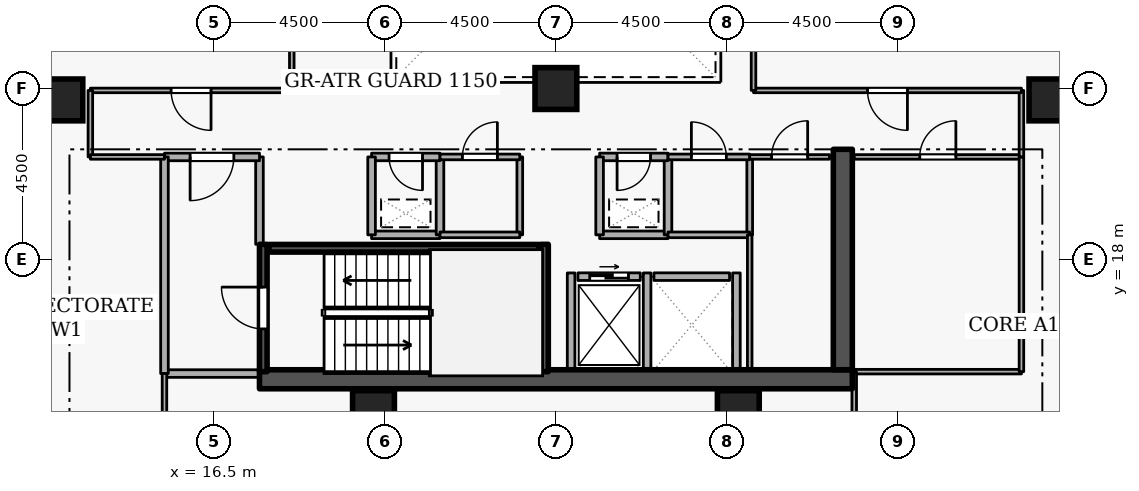
"""IFC4 building model, lengths in metres.
Left out: names, types, materials, properties, quantities, classifications, styles, units other than length and angle.
Written with IfcOpenShell. Run it as: python <this file> out.ifc"""

import sys

from ifc_helpers import new_model, si_unit, direction, frame, frame_2d, origin, origin_2d, place, context, subcontext, project, spatial, rectangle, extrude, element, fill, save


model = new_model("IFC4")
c1 = context("Model", 3, precision=1e-05, world=origin(), true_north=direction((0.0, 1.0)))
c2 = subcontext(c1, "Body", "Model", "MODEL_VIEW")
j1 = project(units=[si_unit("LENGTHUNIT", "METRE"), si_unit("PLANEANGLEUNIT", "RADIAN")], contexts=[c1])
p1 = place(None, origin())
s1 = spatial("IfcSite", under=j1, at=p1, CompositionType="ELEMENT")
p2 = place(p1, origin())
s2 = spatial("IfcBuilding", under=s1, at=p2, CompositionType="ELEMENT")
p3 = place(p2, frame((0.0, 0.0, 156.3)))
s3 = spatial("IfcBuildingStorey", under=s2, at=p3, CompositionType="ELEMENT", Elevation=156.3)
p4 = place(p3, frame((17.7, 14.85, 0.0), z_axis=(0.0, 0.0, 1.0), x_axis=(1.0, 0.0, 0.0)))
e1 = element("IfcWall", 1, at=p4, inside=s3, PredefinedType="SHEAR", context=c2, shape_type="SweptSolid", body=[
    extrude(rectangle(XDim=15.6, YDim=0.5, at=frame_2d((7.8, 0.0))), origin(), (0.0, 0.0, 1.0), 3.6),
])
p5 = place(p3, frame((33.05, 15.1, 0.0), z_axis=(0.0, 0.0, 1.0), x_axis=(0.0, 1.0, 0.0)))
e2 = element("IfcWall", 2, at=p5, inside=s3, PredefinedType="SHEAR", context=c2, shape_type="SweptSolid", body=[
    extrude(rectangle(XDim=5.8, YDim=0.5, at=frame_2d((2.9, 0.0))), origin(), (0.0, 0.0, 1.0), 3.6),
])
for number, where, z_axis, x_axis in (
    (3, (12.5, 22.2, 0.0), (0.0, 0.0, 1.0), (1.0, 0.0, 0.0)),
    (4, (38.5, 22.2, 0.0), (0.0, 0.0, 1.0), (1.0, 0.0, 0.0)),
    (5, (20.7, 14.0, 0.0), (0.0, 0.0, 1.0), (1.0, 0.0, 0.0)),
    (6, (30.3, 14.0, 0.0), (0.0, 0.0, 1.0), (1.0, 0.0, 0.0)),
    (7, (25.5, 22.5, 0.0), (0.0, 0.0, 1.0), (1.0, 0.0, 0.0)),
):
    element("IfcColumn", number, at=place(p3, frame(where, z_axis=z_axis, x_axis=x_axis)), inside=s3, PredefinedType="COLUMN", context=c2, shape_type="SweptSolid", body=[
        extrude(rectangle(XDim=1.1, YDim=1.1, at=origin_2d()), origin(), (0.0, 0.0, 1.0), 3.6),
    ])
p6 = place(p3, frame((26.08, 17.55, 0.0), z_axis=(0.0, 0.0, 1.0), x_axis=(1.0, 0.0, 0.0)))
e8 = element("IfcWall", 8, at=p6, inside=s3, PredefinedType="STANDARD", context=c2, shape_type="SweptSolid", body=[
    extrude(rectangle(XDim=1.64, YDim=0.2, at=frame_2d((0.82, 0.0))), origin(), (0.0, 0.0, 1.0), 3.34),
])
p7 = place(p6, frame((0.31, 0.0, 0.0)))
e9 = element("IfcOpeningElement", 9, at=p7, cuts=e8, PredefinedType="OPENING", context=c2, shape_type="SweptSolid", body=[
    extrude(rectangle(XDim=1.02, YDim=2.06, at=frame_2d((0.51, 1.03))), frame((0.0, 0.11, 0.0), z_axis=(0.0, -1.0, 0.0), x_axis=(1.0, 0.0, 0.0)), (0.0, 0.0, 1.0), 0.22),
])
p8 = place(p3, frame((28.08, 17.55, 0.0), z_axis=(0.0, 0.0, 1.0), x_axis=(1.0, 0.0, 0.0)))
e10 = element("IfcWall", 10, at=p8, inside=s3, PredefinedType="STANDARD", context=c2, shape_type="SweptSolid", body=[
    extrude(rectangle(XDim=1.99, YDim=0.2, at=frame_2d((0.995, 0.0))), origin(), (0.0, 0.0, 1.0), 3.34),
])
for number, where, z_axis, x_axis in (
    (11, (27.9, 15.112, 0.0), (0.0, 0.0, 1.0), (0.0, 1.0, 0.0)),
    (12, (25.9, 15.112, 0.0), (0.0, 0.0, 1.0), (0.0, 1.0, 0.0)),
    (13, (30.25, 15.112, 0.0), (0.0, 0.0, 1.0), (0.0, 1.0, 0.0)),
):
    element("IfcWall", number, at=place(p3, frame(where, z_axis=z_axis, x_axis=x_axis)), inside=s3, PredefinedType="STANDARD", context=c2, shape_type="SweptSolid", body=[
        extrude(rectangle(XDim=2.536, YDim=0.2, at=frame_2d((1.268, 0.0))), origin(), (0.0, 0.0, 1.0), 3.34),
    ])
p9 = place(p3, frame((17.8, 15.05, 0.0), z_axis=(0.0, 0.0, 1.0), x_axis=(0.0, 1.0, 0.0)))
e14 = element("IfcWall", 14, at=p9, inside=s3, PredefinedType="SHEAR", context=c2, shape_type="SweptSolid", body=[
    extrude(rectangle(XDim=3.35, YDim=0.2, at=frame_2d((1.675, 0.0))), origin(), (0.0, 0.0, 1.0), 3.6),
])
p10 = place(p9, frame((1.125, 0.0, 0.0)))
e15 = element("IfcOpeningElement", 15, at=p10, cuts=e14, PredefinedType="OPENING", context=c2, shape_type="SweptSolid", body=[
    extrude(rectangle(XDim=1.1, YDim=2.1, at=frame_2d((0.55, 1.05))), frame((0.0, 0.11, 0.0), z_axis=(0.0, -1.0, 0.0), x_axis=(1.0, 0.0, 0.0)), (0.0, 0.0, 1.0), 0.22),
])
p11 = place(p3, frame((25.2, 18.4, 0.0), z_axis=(0.0, 0.0, 1.0), x_axis=(0.0, -1.0, 0.0)))
e16 = element("IfcWall", 16, at=p11, inside=s3, PredefinedType="SHEAR", context=c2, shape_type="SweptSolid", body=[
    extrude(rectangle(XDim=3.35, YDim=0.2, at=frame_2d((1.675, 0.0))), origin(), (0.0, 0.0, 1.0), 3.6),
])
p12 = place(p3, frame((25.05, 18.297, 0.0), z_axis=(0.0, 0.0, 1.0), x_axis=(-1.0, 0.0, 0.0)))
e17 = element("IfcWall", 17, at=p12, inside=s3, PredefinedType="SHEAR", context=c2, shape_type="SweptSolid", body=[
    extrude(rectangle(XDim=7.1, YDim=0.2, at=frame_2d((3.55, 0.0))), origin(), (0.0, 0.0, 1.0), 3.6),
])
p13 = place(p3, frame((15.2, 15.0, 0.0), z_axis=(0.0, 0.0, 1.0), x_axis=(1.0, 0.0, 0.0)))
e18 = element("IfcWall", 18, at=p13, inside=s3, PredefinedType="STANDARD", context=c2, shape_type="SweptSolid", body=[
    extrude(rectangle(XDim=2.5, YDim=0.2, at=frame_2d((1.25, 0.0))), origin(), (0.0, 0.0, 1.0), 3.34),
])
p14 = place(p3, frame((17.7, 18.4, 0.0), z_axis=(0.0, 0.0, 1.0), x_axis=(0.0, 1.0, 0.0)))
e19 = element("IfcWall", 19, at=p14, inside=s3, PredefinedType="STANDARD", context=c2, shape_type="SweptSolid", body=[
    extrude(rectangle(XDim=2.3, YDim=0.2, at=frame_2d((1.15, 0.0))), origin(), (0.0, 0.0, 1.0), 2.545),
])
p15 = place(p3, frame((17.7, 20.7, 0.0), z_axis=(0.0, 0.0, 1.0), x_axis=(-1.0, 0.0, 0.0)))
e20 = element("IfcWall", 20, at=p15, inside=s3, PredefinedType="STANDARD", context=c2, shape_type="SweptSolid", body=[
    extrude(rectangle(XDim=2.5, YDim=0.2, at=frame_2d((1.25, 0.0))), origin(), (0.0, 0.0, 1.0), 3.34),
])
p16 = place(p15, frame((0.675, 0.0, 0.0)))
e21 = element("IfcOpeningElement", 21, at=p16, cuts=e20, PredefinedType="OPENING", context=c2, shape_type="SweptSolid", body=[
    extrude(rectangle(XDim=1.15, YDim=2.1, at=frame_2d((0.575, 1.05))), frame((0.0, 0.11, 0.0), z_axis=(0.0, -1.0, 0.0), x_axis=(1.0, 0.0, 0.0)), (0.0, 0.0, 1.0), 0.22),
])
p17 = place(p3, frame((15.2, 20.7, 0.0), z_axis=(0.0, 0.0, 1.0), x_axis=(0.0, -1.0, 0.0)))
e22 = element("IfcWall", 22, at=p17, inside=s3, PredefinedType="STANDARD", context=c2, shape_type="SweptSolid", body=[
    extrude(rectangle(XDim=5.7, YDim=0.2, at=frame_2d((2.85, 0.0))), origin(), (0.0, 0.0, 1.0), 3.34),
])
p18 = place(p3, frame((26.65, 18.65, 0.0), z_axis=(0.0, 0.0, 1.0), x_axis=(1.0, 0.0, 0.0)))
e23 = element("IfcWall", 23, at=p18, inside=s3, PredefinedType="STANDARD", context=c2, shape_type="SweptSolid", body=[
    extrude(rectangle(XDim=1.8, YDim=0.2, at=frame_2d((0.9, 0.0))), origin(), (0.0, 0.0, 1.0), 3.34),
])
p19 = place(p3, frame((28.45, 18.65, 0.0), z_axis=(0.0, 0.0, 1.0), x_axis=(0.0, 1.0, 0.0)))
e24 = element("IfcWall", 24, at=p19, inside=s3, PredefinedType="STANDARD", context=c2, shape_type="SweptSolid", body=[
    extrude(rectangle(XDim=2.05, YDim=0.2, at=frame_2d((1.025, 0.0))), origin(), (0.0, 0.0, 1.0), 3.34),
])
p20 = place(p3, frame((28.45, 20.7, 0.0), z_axis=(0.0, 0.0, 1.0), x_axis=(-1.0, 0.0, 0.0)))
e25 = element("IfcWall", 25, at=p20, inside=s3, PredefinedType="STANDARD", context=c2, shape_type="SweptSolid", body=[
    extrude(rectangle(XDim=1.8, YDim=0.2, at=frame_2d((0.9, 0.0))), origin(), (0.0, 0.0, 1.0), 3.34),
])
p21 = place(p20, frame((0.46, 0.0, 0.0)))
e26 = element("IfcOpeningElement", 26, at=p21, cuts=e25, PredefinedType="OPENING", context=c2, shape_type="SweptSolid", body=[
    extrude(rectangle(XDim=0.88, YDim=2.04, at=frame_2d((0.44, 1.02))), frame((0.0, 0.11, 0.0), z_axis=(0.0, -1.0, 0.0), x_axis=(1.0, 0.0, 0.0)), (0.0, 0.0, 1.0), 0.22),
])
p22 = place(p3, frame((26.65, 20.7, 0.0), z_axis=(0.0, 0.0, 1.0), x_axis=(0.0, -1.0, 0.0)))
e27 = element("IfcWall", 27, at=p22, inside=s3, PredefinedType="STANDARD", context=c2, shape_type="SweptSolid", body=[
    extrude(rectangle(XDim=2.05, YDim=0.2, at=frame_2d((1.025, 0.0))), origin(), (0.0, 0.0, 1.0), 3.34),
])
p23 = place(p3, frame((20.65, 18.65, 0.0), z_axis=(0.0, 0.0, 1.0), x_axis=(1.0, 0.0, 0.0)))
e28 = element("IfcWall", 28, at=p23, inside=s3, PredefinedType="STANDARD", context=c2, shape_type="SweptSolid", body=[
    extrude(rectangle(XDim=1.8, YDim=0.2, at=frame_2d((0.9, 0.0))), origin(), (0.0, 0.0, 1.0), 3.34),
])
p24 = place(p3, frame((22.45, 18.65, 0.0), z_axis=(0.0, 0.0, 1.0), x_axis=(0.0, 1.0, 0.0)))
e29 = element("IfcWall", 29, at=p24, inside=s3, PredefinedType="STANDARD", context=c2, shape_type="SweptSolid", body=[
    extrude(rectangle(XDim=2.05, YDim=0.2, at=frame_2d((1.025, 0.0))), origin(), (0.0, 0.0, 1.0), 3.34),
])
p25 = place(p3, frame((22.45, 20.7, 0.0), z_axis=(0.0, 0.0, 1.0), x_axis=(-1.0, 0.0, 0.0)))
e30 = element("IfcWall", 30, at=p25, inside=s3, PredefinedType="STANDARD", context=c2, shape_type="SweptSolid", body=[
    extrude(rectangle(XDim=1.8, YDim=0.2, at=frame_2d((0.9, 0.0))), origin(), (0.0, 0.0, 1.0), 3.34),
])
p26 = place(p25, frame((0.46, 0.0, 0.0)))
e31 = element("IfcOpeningElement", 31, at=p26, cuts=e30, PredefinedType="OPENING", context=c2, shape_type="SweptSolid", body=[
    extrude(rectangle(XDim=0.88, YDim=2.04, at=frame_2d((0.44, 1.02))), frame((0.0, 0.11, 0.0), z_axis=(0.0, -1.0, 0.0), x_axis=(1.0, 0.0, 0.0)), (0.0, 0.0, 1.0), 0.22),
])
p27 = place(p3, frame((20.65, 20.7, 0.0), z_axis=(0.0, 0.0, 1.0), x_axis=(0.0, -1.0, 0.0)))
e32 = element("IfcWall", 32, at=p27, inside=s3, PredefinedType="STANDARD", context=c2, shape_type="SweptSolid", body=[
    extrude(rectangle(XDim=2.05, YDim=0.2, at=frame_2d((1.025, 0.0))), origin(), (0.0, 0.0, 1.0), 3.34),
])
p28 = place(p3, frame((24.55, 20.7, 0.0), z_axis=(0.0, 0.0, 1.0), x_axis=(0.0, -1.0, 0.0)))
e33 = element("IfcWall", 33, at=p28, inside=s3, PredefinedType="PARTITIONING", context=c2, shape_type="SweptSolid", body=[
    extrude(rectangle(XDim=2.05, YDim=0.15, at=frame_2d((1.025, 0.0))), origin(), (0.0, 0.0, 1.0), 3.34),
])
p29 = place(p3, frame((24.55, 18.65, 0.0), z_axis=(0.0, 0.0, 1.0), x_axis=(-1.0, 0.0, 0.0)))
e34 = element("IfcWall", 34, at=p29, inside=s3, PredefinedType="PARTITIONING", context=c2, shape_type="SweptSolid", body=[
    extrude(rectangle(XDim=2.1, YDim=0.15, at=frame_2d((1.05, 0.0))), origin(), (0.0, 0.0, 1.0), 3.34),
])
p30 = place(p3, frame((22.45, 20.7, 0.0), z_axis=(0.0, 0.0, 1.0), x_axis=(1.0, 0.0, 0.0)))
e35 = element("IfcWall", 35, at=p30, inside=s3, PredefinedType="PARTITIONING", context=c2, shape_type="SweptSolid", body=[
    extrude(rectangle(XDim=2.1, YDim=0.15, at=frame_2d((1.05, 0.0))), origin(), (0.0, 0.0, 1.0), 3.34),
])
p31 = place(p30, frame((0.59, 0.0, 0.0)))
e36 = element("IfcOpeningElement", 36, at=p31, cuts=e35, PredefinedType="OPENING", context=c2, shape_type="SweptSolid", body=[
    extrude(rectangle(XDim=0.92, YDim=2.08, at=frame_2d((0.46, 1.04))), frame((0.0, 0.085, 0.0), z_axis=(0.0, -1.0, 0.0), x_axis=(1.0, 0.0, 0.0)), (0.0, 0.0, 1.0), 0.17),
])
p32 = place(p3, frame((30.6, 20.7, 0.0), z_axis=(0.0, 0.0, 1.0), x_axis=(0.0, -1.0, 0.0)))
e37 = element("IfcWall", 37, at=p32, inside=s3, PredefinedType="PARTITIONING", context=c2, shape_type="SweptSolid", body=[
    extrude(rectangle(XDim=2.05, YDim=0.15, at=frame_2d((1.025, 0.0))), origin(), (0.0, 0.0, 1.0), 3.34),
])
p33 = place(p3, frame((30.6, 18.65, 0.0), z_axis=(0.0, 0.0, 1.0), x_axis=(-1.0, 0.0, 0.0)))
e38 = element("IfcWall", 38, at=p33, inside=s3, PredefinedType="PARTITIONING", context=c2, shape_type="SweptSolid", body=[
    extrude(rectangle(XDim=2.15, YDim=0.15, at=frame_2d((1.075, 0.0))), origin(), (0.0, 0.0, 1.0), 3.34),
])
p34 = place(p3, frame((28.45, 20.7, 0.0), z_axis=(0.0, 0.0, 1.0), x_axis=(1.0, 0.0, 0.0)))
e39 = element("IfcWall", 39, at=p34, inside=s3, PredefinedType="PARTITIONING", context=c2, shape_type="SweptSolid", body=[
    extrude(rectangle(XDim=2.15, YDim=0.15, at=frame_2d((1.075, 0.0))), origin(), (0.0, 0.0, 1.0), 3.34),
])
p35 = place(p34, frame((0.615, 0.0, 0.0)))
e40 = element("IfcOpeningElement", 40, at=p35, cuts=e39, PredefinedType="OPENING", context=c2, shape_type="SweptSolid", body=[
    extrude(rectangle(XDim=0.92, YDim=2.08, at=frame_2d((0.46, 1.04))), frame((0.0, 0.085, 0.0), z_axis=(0.0, -1.0, 0.0), x_axis=(1.0, 0.0, 0.0)), (0.0, 0.0, 1.0), 0.17),
])
p36 = place(p3, frame((30.6, 15.1, 0.0), z_axis=(0.0, 0.0, 1.0), x_axis=(0.0, 1.0, 0.0)))
e41 = element("IfcWall", 41, at=p36, inside=s3, PredefinedType="PARTITIONING", context=c2, shape_type="SweptSolid", body=[
    extrude(rectangle(XDim=3.55, YDim=0.12, at=frame_2d((1.775, 0.0))), origin(), (0.0, 0.0, 1.0), 3.34),
])
p37 = place(p3, frame((30.6, 20.7, 0.0), z_axis=(0.0, 0.0, 1.0), x_axis=(1.0, 0.0, 0.0)))
e42 = element("IfcWall", 42, at=p37, inside=s3, PredefinedType="PARTITIONING", context=c2, shape_type="SweptSolid", body=[
    extrude(rectangle(XDim=2.1, YDim=0.12, at=frame_2d((1.05, 0.0))), origin(), (0.0, 0.0, 1.0), 3.34),
])
p38 = place(p37, frame((0.575, 0.0, 0.0)))
e43 = element("IfcOpeningElement", 43, at=p38, cuts=e42, PredefinedType="OPENING", context=c2, shape_type="SweptSolid", body=[
    extrude(rectangle(XDim=0.95, YDim=2.1, at=frame_2d((0.475, 1.05))), frame((0.0, 0.07, 0.0), z_axis=(0.0, -1.0, 0.0), x_axis=(1.0, 0.0, 0.0)), (0.0, 0.0, 1.0), 0.14),
])
p39 = place(p3, frame((37.75, 15.05, 0.0), z_axis=(0.0, 0.0, 1.0), x_axis=(-1.0, 0.0, 0.0)))
e44 = element("IfcWall", 44, at=p39, inside=s3, PredefinedType="PARTITIONING", context=c2, shape_type="SweptSolid", body=[
    extrude(rectangle(XDim=4.4, YDim=0.12, at=frame_2d((2.2, 0.0))), origin(), (0.0, 0.0, 1.0), 3.34),
])
p40 = place(p3, frame((33.35, 20.7, 0.0), z_axis=(0.0, 0.0, 1.0), x_axis=(1.0, 0.0, 0.0)))
e45 = element("IfcWall", 45, at=p40, inside=s3, PredefinedType="PARTITIONING", context=c2, shape_type="SweptSolid", body=[
    extrude(rectangle(XDim=4.4, YDim=0.12, at=frame_2d((2.2, 0.0))), origin(), (0.0, 0.0, 1.0), 3.34),
])
p41 = place(p40, frame((1.725, 0.0, 0.0)))
e46 = element("IfcOpeningElement", 46, at=p41, cuts=e45, PredefinedType="OPENING", context=c2, shape_type="SweptSolid", body=[
    extrude(rectangle(XDim=0.95, YDim=2.1, at=frame_2d((0.475, 1.05))), frame((0.0, 0.07, 0.0), z_axis=(0.0, -1.0, 0.0), x_axis=(1.0, 0.0, 0.0)), (0.0, 0.0, 1.0), 0.14),
])
p42 = place(p3, frame((37.75, 20.7, 0.0), z_axis=(0.0, 0.0, 1.0), x_axis=(0.0, -1.0, 0.0)))
e47 = element("IfcWall", 47, at=p42, inside=s3, PredefinedType="PARTITIONING", context=c2, shape_type="SweptSolid", body=[
    extrude(rectangle(XDim=5.65, YDim=0.12, at=frame_2d((2.825, 0.0))), origin(), (0.0, 0.0, 1.0), 3.34),
])
p43 = place(p3, frame((18.55, 27.0, 0.0), z_axis=(0.0, 0.0, 1.0), x_axis=(0.0, -1.0, 0.0)))
e48 = element("IfcWall", 48, at=p43, inside=s3, PredefinedType="PARTITIONING", context=c2, shape_type="SweptSolid", body=[
    extrude(rectangle(XDim=4.55, YDim=0.12, at=frame_2d((2.275, 0.0))), origin(), (0.0, 0.0, 1.0), 3.34),
])
p44 = place(p3, frame((18.55, 22.45, 0.0), z_axis=(0.0, 0.0, 1.0), x_axis=(-1.0, 0.0, 0.0)))
e49 = element("IfcWall", 49, at=p44, inside=s3, PredefinedType="PARTITIONING", context=c2, shape_type="SweptSolid", body=[
    extrude(rectangle(XDim=5.3, YDim=0.12, at=frame_2d((2.65, 0.0))), origin(), (0.0, 0.0, 1.0), 3.34),
])
p45 = place(p44, frame((2.125, 0.0, 0.0)))
e50 = element("IfcOpeningElement", 50, at=p45, cuts=e49, PredefinedType="OPENING", context=c2, shape_type="SweptSolid", body=[
    extrude(rectangle(XDim=1.05, YDim=2.1, at=frame_2d((0.525, 1.05))), frame((0.0, 0.07, 0.0), z_axis=(0.0, -1.0, 0.0), x_axis=(1.0, 0.0, 0.0)), (0.0, 0.0, 1.0), 0.14),
])
p46 = place(p3, frame((13.25, 22.45, 0.0), z_axis=(0.0, 0.0, 1.0), x_axis=(0.0, -1.0, 0.0)))
e51 = element("IfcWall", 51, at=p46, inside=s3, PredefinedType="PARTITIONING", context=c2, shape_type="SweptSolid", body=[
    extrude(rectangle(XDim=1.75, YDim=0.12, at=frame_2d((0.875, 0.0))), origin(), (0.0, 0.0, 1.0), 3.34),
])
p47 = place(p3, frame((13.25, 20.7, 0.0), z_axis=(0.0, 0.0, 1.0), x_axis=(1.0, 0.0, 0.0)))
e52 = element("IfcWall", 52, at=p47, inside=s3, PredefinedType="PARTITIONING", context=c2, shape_type="SweptSolid", body=[
    extrude(rectangle(XDim=1.95, YDim=0.12, at=frame_2d((0.975, 0.0))), origin(), (0.0, 0.0, 1.0), 3.34),
])
p48 = place(p3, frame((15.2, 15.0, 0.0), z_axis=(0.0, 0.0, 1.0), x_axis=(0.0, -1.0, 0.0)))
e53 = element("IfcWall", 53, at=p48, inside=s3, PredefinedType="PARTITIONING", context=c2, shape_type="SweptSolid", body=[
    extrude(rectangle(XDim=11.72, YDim=0.12, at=frame_2d((5.86, 0.0))), origin(), (0.0, 0.0, 1.0), 3.34),
])
p49 = place(p3, frame((33.35, 3.28, 0.0), z_axis=(0.0, 0.0, 1.0), x_axis=(0.0, 1.0, 0.0)))
e54 = element("IfcWall", 54, at=p49, inside=s3, PredefinedType="PARTITIONING", context=c2, shape_type="SweptSolid", body=[
    extrude(rectangle(XDim=11.77, YDim=0.12, at=frame_2d((5.885, 0.0))), origin(), (0.0, 0.0, 1.0), 2.545),
])
p50 = place(p3, frame((37.75, 20.7, 0.0), z_axis=(0.0, 0.0, 1.0), x_axis=(0.0, 1.0, 0.0)))
e55 = element("IfcWall", 55, at=p50, inside=s3, PredefinedType="PARTITIONING", context=c2, shape_type="SweptSolid", body=[
    extrude(rectangle(XDim=1.75, YDim=0.12, at=frame_2d((0.875, 0.0))), origin(), (0.0, 0.0, 1.0), 3.34),
])
p51 = place(p3, frame((37.75, 22.45, 0.0), z_axis=(0.0, 0.0, 1.0), x_axis=(-1.0, 0.0, 0.0)))
e56 = element("IfcWall", 56, at=p51, inside=s3, PredefinedType="PARTITIONING", context=c2, shape_type="SweptSolid", body=[
    extrude(rectangle(XDim=7.05, YDim=0.12, at=frame_2d((3.525, 0.0))), origin(), (0.0, 0.0, 1.0), 3.34),
])
p52 = place(p51, frame((3.0, 0.0, 0.0)))
e57 = element("IfcOpeningElement", 57, at=p52, cuts=e56, PredefinedType="OPENING", context=c2, shape_type="SweptSolid", body=[
    extrude(rectangle(XDim=1.05, YDim=2.1, at=frame_2d((0.525, 1.05))), frame((0.0, 0.07, 0.0), z_axis=(0.0, -1.0, 0.0), x_axis=(1.0, 0.0, 0.0)), (0.0, 0.0, 1.0), 0.14),
])
p53 = place(p3, frame((30.7, 22.45, 0.0), z_axis=(0.0, 0.0, 1.0), x_axis=(0.0, 1.0, 0.0)))
e58 = element("IfcWall", 58, at=p53, inside=s3, PredefinedType="PARTITIONING", context=c2, shape_type="SweptSolid", body=[
    extrude(rectangle(XDim=4.55, YDim=0.12, at=frame_2d((2.275, 0.0))), origin(), (0.0, 0.0, 1.0), 3.34),
])
p54 = place(p7, origin())
e59 = element("IfcDoor", 59, at=p54, inside=s3, OperationType="SLIDING_TO_LEFT", PredefinedType="DOOR", context=c2, shape_type="SweptSolid", body=[
    extrude(rectangle(XDim=1.02, YDim=2.06, at=frame_2d((0.51, 1.03))), frame((0.0, 0.025, 0.0), z_axis=(0.0, -1.0, 0.0), x_axis=(1.0, 0.0, 0.0)), (0.0, 0.0, 1.0), 0.05),
])
fill(e9, e59)
p55 = place(p10, origin())
e60 = element("IfcDoor", 60, at=p55, inside=s3, OperationType="SINGLE_SWING_RIGHT", PredefinedType="DOOR", context=c2, shape_type="SweptSolid", body=[
    extrude(rectangle(XDim=1.1, YDim=2.1, at=frame_2d((0.55, 1.05))), frame((0.0, 0.025, 0.0), z_axis=(0.0, -1.0, 0.0), x_axis=(1.0, 0.0, 0.0)), (0.0, 0.0, 1.0), 0.05),
])
fill(e15, e60)
p56 = place(p16, origin())
e61 = element("IfcDoor", 61, at=p56, inside=s3, OperationType="SINGLE_SWING_RIGHT", PredefinedType="DOOR", context=c2, shape_type="SweptSolid", body=[
    extrude(rectangle(XDim=1.15, YDim=2.1, at=frame_2d((0.575, 1.05))), frame((0.0, 0.025, 0.0), z_axis=(0.0, -1.0, 0.0), x_axis=(1.0, 0.0, 0.0)), (0.0, 0.0, 1.0), 0.05),
])
fill(e21, e61)
p57 = place(p21, origin())
e62 = element("IfcDoor", 62, at=p57, inside=s3, OperationType="SINGLE_SWING_RIGHT", PredefinedType="DOOR", context=c2, shape_type="SweptSolid", body=[
    extrude(rectangle(XDim=0.88, YDim=2.04, at=frame_2d((0.44, 1.02))), frame((0.0, 0.025, 0.0), z_axis=(0.0, -1.0, 0.0), x_axis=(1.0, 0.0, 0.0)), (0.0, 0.0, 1.0), 0.05),
])
fill(e26, e62)
p58 = place(p26, origin())
e63 = element("IfcDoor", 63, at=p58, inside=s3, OperationType="SINGLE_SWING_LEFT", PredefinedType="DOOR", context=c2, shape_type="SweptSolid", body=[
    extrude(rectangle(XDim=0.88, YDim=2.04, at=frame_2d((0.44, 1.02))), frame((0.0, 0.025, 0.0), z_axis=(0.0, -1.0, 0.0), x_axis=(1.0, 0.0, 0.0)), (0.0, 0.0, 1.0), 0.05),
])
fill(e31, e63)
p59 = place(p31, origin())
e64 = element("IfcDoor", 64, at=p59, inside=s3, OperationType="SINGLE_SWING_RIGHT", PredefinedType="DOOR", context=c2, shape_type="SweptSolid", body=[
    extrude(rectangle(XDim=0.92, YDim=2.08, at=frame_2d((0.46, 1.04))), frame((0.0, 0.025, 0.0), z_axis=(0.0, -1.0, 0.0), x_axis=(1.0, 0.0, 0.0)), (0.0, 0.0, 1.0), 0.05),
])
fill(e36, e64)
p60 = place(p35, origin())
e65 = element("IfcDoor", 65, at=p60, inside=s3, OperationType="SINGLE_SWING_LEFT", PredefinedType="DOOR", context=c2, shape_type="SweptSolid", body=[
    extrude(rectangle(XDim=0.92, YDim=2.08, at=frame_2d((0.46, 1.04))), frame((0.0, 0.025, 0.0), z_axis=(0.0, -1.0, 0.0), x_axis=(1.0, 0.0, 0.0)), (0.0, 0.0, 1.0), 0.05),
])
fill(e40, e65)
p61 = place(p38, origin())
e66 = element("IfcDoor", 66, at=p61, inside=s3, OperationType="SINGLE_SWING_RIGHT", PredefinedType="DOOR", context=c2, shape_type="SweptSolid", body=[
    extrude(rectangle(XDim=0.95, YDim=2.1, at=frame_2d((0.475, 1.05))), frame((0.0, 0.025, 0.0), z_axis=(0.0, -1.0, 0.0), x_axis=(1.0, 0.0, 0.0)), (0.0, 0.0, 1.0), 0.05),
])
fill(e43, e66)
p62 = place(p41, origin())
e67 = element("IfcDoor", 67, at=p62, inside=s3, OperationType="SINGLE_SWING_RIGHT", PredefinedType="DOOR", context=c2, shape_type="SweptSolid", body=[
    extrude(rectangle(XDim=0.95, YDim=2.1, at=frame_2d((0.475, 1.05))), frame((0.0, 0.025, 0.0), z_axis=(0.0, -1.0, 0.0), x_axis=(1.0, 0.0, 0.0)), (0.0, 0.0, 1.0), 0.05),
])
fill(e46, e67)
p63 = place(p45, origin())
e68 = element("IfcDoor", 68, at=p63, inside=s3, OperationType="SINGLE_SWING_LEFT", PredefinedType="DOOR", context=c2, shape_type="SweptSolid", body=[
    extrude(rectangle(XDim=1.05, YDim=2.1, at=frame_2d((0.525, 1.05))), frame((0.0, 0.025, 0.0), z_axis=(0.0, -1.0, 0.0), x_axis=(1.0, 0.0, 0.0)), (0.0, 0.0, 1.0), 0.05),
])
fill(e50, e68)
p64 = place(p52, origin())
e69 = element("IfcDoor", 69, at=p64, inside=s3, OperationType="SINGLE_SWING_LEFT", PredefinedType="DOOR", context=c2, shape_type="SweptSolid", body=[
    extrude(rectangle(XDim=1.05, YDim=2.1, at=frame_2d((0.525, 1.05))), frame((0.0, 0.025, 0.0), z_axis=(0.0, -1.0, 0.0), x_axis=(1.0, 0.0, 0.0)), (0.0, 0.0, 1.0), 0.05),
])
fill(e57, e69)
save(model, sys.argv[1])
